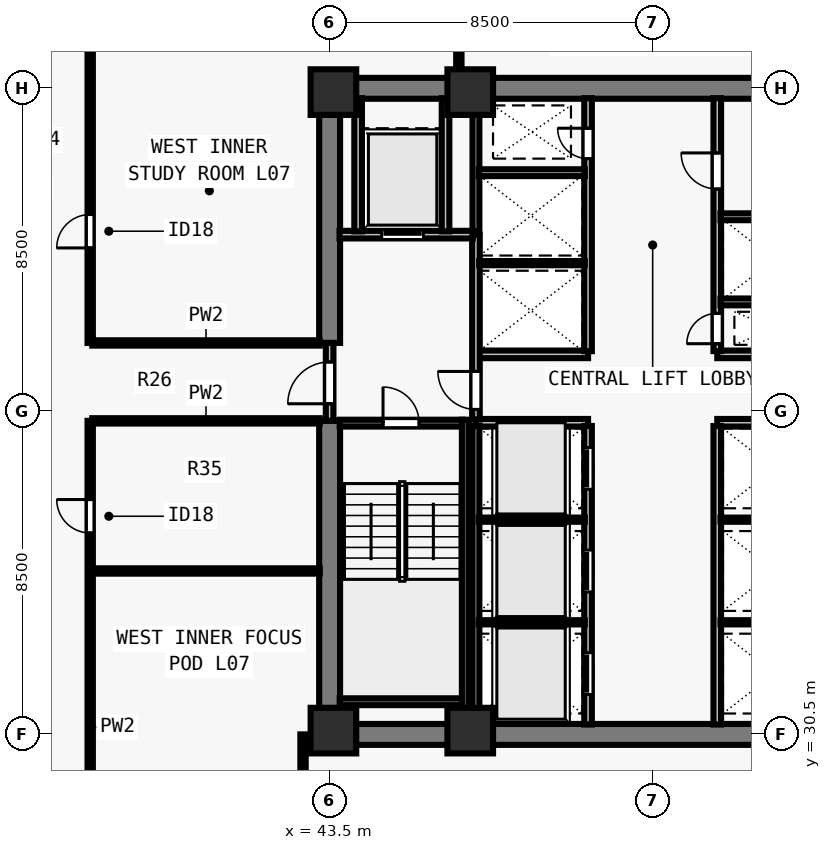
"""IFC4 building model, lengths in metres.
Left out: names, types, materials, properties, quantities, classifications, styles, units other than length and angle.
Written with IfcOpenShell. Run it as: python <this file> out.ifc"""

import sys

from ifc_helpers import new_model, si_unit, direction, frame, frame_2d, origin, origin_2d, place, context, subcontext, project, spatial, rectangle, extrude, element, fill, save


model = new_model("IFC4")
c1 = context("Model", 3, precision=1e-05, world=origin(), true_north=direction((0.0, 1.0)))
c2 = subcontext(c1, "Body", "Model", "MODEL_VIEW")
j1 = project(units=[si_unit("LENGTHUNIT", "METRE"), si_unit("PLANEANGLEUNIT", "RADIAN")], contexts=[c1])
p1 = place(None, origin())
s1 = spatial("IfcSite", under=j1, at=p1, CompositionType="ELEMENT")
p2 = place(p1, origin())
s2 = spatial("IfcBuilding", under=s1, at=p2, CompositionType="ELEMENT")
p3 = place(p2, frame((0.0, 0.0, 30.5)))
s3 = spatial("IfcBuildingStorey", under=s2, at=p3, CompositionType="ELEMENT", Elevation=30.5)
for number, where, z_axis, x_axis in (
    (1, (43.6, 30.6, 0.0), (0.0, 0.0, 1.0), (1.0, 0.0, 0.0)),
    (2, (47.2, 30.6, 0.0), (0.0, 0.0, 1.0), (1.0, 0.0, 0.0)),
    (3, (43.6, 47.4, 0.0), (0.0, 0.0, 1.0), (1.0, 0.0, 0.0)),
    (4, (47.2, 47.4, 0.0), (0.0, 0.0, 1.0), (1.0, 0.0, 0.0)),
):
    element("IfcColumn", number, at=place(p3, frame(where, z_axis=z_axis, x_axis=x_axis)), inside=s3, PredefinedType="COLUMN", context=c2, shape_type="SweptSolid", body=[
        extrude(rectangle(XDim=1.2, YDim=1.2, at=origin_2d()), origin(), (0.0, 0.0, 1.0), 3.5),
    ])
for number, where, z_axis, x_axis in (
    (5, (43.225, 30.5, 0.0), (0.0, 0.0, 1.0), (1.0, 0.0, 0.0)),
    (6, (43.225, 47.5, 0.0), (0.0, 0.0, 1.0), (1.0, 0.0, 0.0)),
):
    element("IfcWall", number, at=place(p3, frame(where, z_axis=z_axis, x_axis=x_axis)), inside=s3, PredefinedType="SHEAR", context=c2, shape_type="SweptSolid", body=[
        extrude(rectangle(XDim=17.55, YDim=0.55, at=frame_2d((8.775, 0.0))), origin(), (0.0, 0.0, 1.0), 3.28),
    ])
p4 = place(p3, frame((43.5, 30.765, 0.0), z_axis=(0.0, 0.0, 1.0), x_axis=(0.0, 1.0, 0.0)))
e7 = element("IfcWall", 7, at=p4, inside=s3, PredefinedType="SHEAR", context=c2, shape_type="SweptSolid", body=[
    extrude(rectangle(XDim=7.985, YDim=0.55, at=frame_2d((3.993, 0.0))), origin(), (0.0, 0.0, 1.0), 3.28),
])
p5 = place(p3, frame((43.5, 40.8, 0.0), z_axis=(0.0, 0.0, 1.0), x_axis=(0.0, 1.0, 0.0)))
e8 = element("IfcWall", 8, at=p5, inside=s3, PredefinedType="SHEAR", context=c2, shape_type="SweptSolid", body=[
    extrude(rectangle(XDim=6.435, YDim=0.55, at=frame_2d((3.218, 0.0))), origin(), (0.0, 0.0, 1.0), 3.28),
])
for number, where, z_axis, x_axis in (
    (9, (47.35, 38.7, 0.0), (0.0, 0.0, 1.0), (1.0, 0.0, 0.0)),
    (10, (47.35, 40.5, 0.0), (0.0, 0.0, 1.0), (1.0, 0.0, 0.0)),
    (11, (53.7, 38.7, 0.0), (0.0, 0.0, 1.0), (1.0, 0.0, 0.0)),
    (12, (53.7, 40.5, 0.0), (0.0, 0.0, 1.0), (1.0, 0.0, 0.0)),
):
    element("IfcWall", number, at=place(p3, frame(where, z_axis=z_axis, x_axis=x_axis)), inside=s3, PredefinedType="SOLIDWALL", context=c2, shape_type="SweptSolid", body=[
        extrude(rectangle(XDim=2.95, YDim=0.2, at=frame_2d((1.475, 0.0))), origin(), (0.0, 0.0, 1.0), 3.28),
    ])
p6 = place(p3, frame((50.3, 30.76, 0.0), z_axis=(0.0, 0.0, 1.0), x_axis=(0.0, 1.0, 0.0)))
e13 = element("IfcWall", 13, at=p6, inside=s3, PredefinedType="SOLIDWALL", context=c2, shape_type="SweptSolid", body=[
    extrude(rectangle(XDim=7.855, YDim=0.2, at=frame_2d((3.927, 0.0))), origin(), (0.0, 0.0, 1.0), 3.28),
])
p7 = place(p6, frame((0.79, 0.0, 0.0)))
e14 = element("IfcOpeningElement", 14, at=p7, cuts=e13, PredefinedType="OPENING", context=c2, shape_type="SweptSolid", body=[
    extrude(rectangle(XDim=1.1, YDim=2.2, at=frame_2d((0.55, 1.1))), frame((0.0, 0.11, 0.0), z_axis=(0.0, -1.0, 0.0), x_axis=(1.0, 0.0, 0.0)), (0.0, 0.0, 1.0), 0.22),
])
p8 = place(p6, frame((3.49, 0.0, 0.0)))
e15 = element("IfcOpeningElement", 15, at=p8, cuts=e13, PredefinedType="OPENING", context=c2, shape_type="SweptSolid", body=[
    extrude(rectangle(XDim=1.1, YDim=2.2, at=frame_2d((0.55, 1.1))), frame((0.0, 0.11, 0.0), z_axis=(0.0, -1.0, 0.0), x_axis=(1.0, 0.0, 0.0)), (0.0, 0.0, 1.0), 0.22),
])
p9 = place(p6, frame((6.19, 0.0, 0.0)))
e16 = element("IfcOpeningElement", 16, at=p9, cuts=e13, PredefinedType="OPENING", context=c2, shape_type="SweptSolid", body=[
    extrude(rectangle(XDim=1.1, YDim=2.2, at=frame_2d((0.55, 1.1))), frame((0.0, 0.11, 0.0), z_axis=(0.0, -1.0, 0.0), x_axis=(1.0, 0.0, 0.0)), (0.0, 0.0, 1.0), 0.22),
])
p10 = place(p3, frame((53.7, 30.76, 0.0), z_axis=(0.0, 0.0, 1.0), x_axis=(0.0, 1.0, 0.0)))
e17 = element("IfcWall", 17, at=p10, inside=s3, PredefinedType="SOLIDWALL", context=c2, shape_type="SweptSolid", body=[
    extrude(rectangle(XDim=7.855, YDim=0.2, at=frame_2d((3.927, 0.0))), origin(), (0.0, 0.0, 1.0), 3.28),
])
p11 = place(p3, frame((50.3, 40.585, 0.0), z_axis=(0.0, 0.0, 1.0), x_axis=(0.0, 1.0, 0.0)))
e18 = element("IfcWall", 18, at=p11, inside=s3, PredefinedType="SOLIDWALL", context=c2, shape_type="SweptSolid", body=[
    extrude(rectangle(XDim=6.655, YDim=0.2, at=frame_2d((3.328, 0.0))), origin(), (0.0, 0.0, 1.0), 3.28),
])
p12 = place(p11, frame((5.065, 0.0, 0.0)))
e19 = element("IfcOpeningElement", 19, at=p12, cuts=e18, PredefinedType="OPENING", context=c2, shape_type="SweptSolid", body=[
    extrude(rectangle(XDim=0.8, YDim=2.08, at=frame_2d((0.4, 1.04))), frame((0.0, 0.11, 0.0), z_axis=(0.0, -1.0, 0.0), x_axis=(1.0, 0.0, 0.0)), (0.0, 0.0, 1.0), 0.22),
])
p13 = place(p3, frame((53.7, 40.585, 0.0), z_axis=(0.0, 0.0, 1.0), x_axis=(0.0, 1.0, 0.0)))
e20 = element("IfcWall", 20, at=p13, inside=s3, PredefinedType="SOLIDWALL", context=c2, shape_type="SweptSolid", body=[
    extrude(rectangle(XDim=6.655, YDim=0.2, at=frame_2d((3.328, 0.0))), origin(), (0.0, 0.0, 1.0), 3.28),
])
p14 = place(p13, frame((0.195, 0.0, 0.0)))
e21 = element("IfcOpeningElement", 21, at=p14, cuts=e20, PredefinedType="OPENING", context=c2, shape_type="SweptSolid", body=[
    extrude(rectangle(XDim=0.8, YDim=2.08, at=frame_2d((0.4, 1.04))), frame((0.0, 0.11, 0.0), z_axis=(0.0, -1.0, 0.0), x_axis=(1.0, 0.0, 0.0)), (0.0, 0.0, 1.0), 0.22),
])
p15 = place(p13, frame((4.265, 0.0, 0.0)))
e22 = element("IfcOpeningElement", 22, at=p15, cuts=e20, PredefinedType="OPENING", context=c2, shape_type="SweptSolid", body=[
    extrude(rectangle(XDim=0.95, YDim=2.12, at=frame_2d((0.475, 1.06))), frame((0.0, 0.11, 0.0), z_axis=(0.0, -1.0, 0.0), x_axis=(1.0, 0.0, 0.0)), (0.0, 0.0, 1.0), 0.22),
])
p16 = place(p3, frame((43.5, 38.75, 0.0), z_axis=(0.0, 0.0, 1.0), x_axis=(0.0, 1.0, 0.0)))
e23 = element("IfcWall", 23, at=p16, inside=s3, PredefinedType="SOLIDWALL", context=c2, shape_type="SweptSolid", body=[
    extrude(rectangle(XDim=2.05, YDim=0.2, at=frame_2d((1.025, 0.0))), origin(), (0.0, 0.0, 1.0), 3.28),
])
p17 = place(p16, frame((0.45, 0.0, 0.0)))
e24 = element("IfcOpeningElement", 24, at=p17, cuts=e23, PredefinedType="OPENING", context=c2, shape_type="SweptSolid", body=[
    extrude(rectangle(XDim=1.1, YDim=2.15, at=frame_2d((0.55, 1.075))), frame((0.0, 0.11, 0.0), z_axis=(0.0, -1.0, 0.0), x_axis=(1.0, 0.0, 0.0)), (0.0, 0.0, 1.0), 0.22),
])
p18 = place(p3, frame((47.35, 38.785, 0.0), z_axis=(0.0, 0.0, 1.0), x_axis=(0.0, 1.0, 0.0)))
e25 = element("IfcWall", 25, at=p18, inside=s3, PredefinedType="SOLIDWALL", context=c2, shape_type="SweptSolid", body=[
    extrude(rectangle(XDim=4.865, YDim=0.2, at=frame_2d((2.433, 0.0))), origin(), (0.0, 0.0, 1.0), 3.28),
])
p19 = place(p18, frame((0.265, 0.0, 0.0)))
e26 = element("IfcOpeningElement", 26, at=p19, cuts=e25, PredefinedType="OPENING", context=c2, shape_type="SweptSolid", body=[
    extrude(rectangle(XDim=1.0, YDim=2.15, at=frame_2d((0.5, 1.075))), frame((0.0, 0.11, 0.0), z_axis=(0.0, -1.0, 0.0), x_axis=(1.0, 0.0, 0.0)), (0.0, 0.0, 1.0), 0.22),
])
p20 = place(p3, frame((43.76, 43.65, 0.0), z_axis=(0.0, 0.0, 1.0), x_axis=(1.0, 0.0, 0.0)))
e27 = element("IfcWall", 27, at=p20, inside=s3, PredefinedType="SOLIDWALL", context=c2, shape_type="SweptSolid", body=[
    extrude(rectangle(XDim=3.505, YDim=0.2, at=frame_2d((1.752, 0.0))), origin(), (0.0, 0.0, 1.0), 3.28),
])
p21 = place(p20, frame((1.11, 0.0, 0.0)))
e28 = element("IfcOpeningElement", 28, at=p21, cuts=e27, PredefinedType="OPENING", context=c2, shape_type="SweptSolid", body=[
    extrude(rectangle(XDim=1.1, YDim=2.2, at=frame_2d((0.55, 1.1))), frame((0.0, 0.11, 0.0), z_axis=(0.0, -1.0, 0.0), x_axis=(1.0, 0.0, 0.0)), (0.0, 0.0, 1.0), 0.22),
])
for number, where, z_axis, x_axis in (
    (29, (46.55, 43.735, 0.0), (0.0, 0.0, 1.0), (0.0, 1.0, 0.0)),
    (30, (44.25, 43.735, 0.0), (0.0, 0.0, 1.0), (0.0, 1.0, 0.0)),
):
    element("IfcWall", number, at=place(p3, frame(where, z_axis=z_axis, x_axis=x_axis)), inside=s3, PredefinedType="SOLIDWALL", context=c2, shape_type="SweptSolid", body=[
        extrude(rectangle(XDim=3.505, YDim=0.2, at=frame_2d((1.752, 0.0))), origin(), (0.0, 0.0, 1.0), 3.28),
    ])
p22 = place(p3, frame((47.35, 30.76, 0.0), z_axis=(0.0, 0.0, 1.0), x_axis=(0.0, 1.0, 0.0)))
e31 = element("IfcWall", 31, at=p22, inside=s3, PredefinedType="SOLIDWALL", context=c2, shape_type="SweptSolid", body=[
    extrude(rectangle(XDim=7.855, YDim=0.18, at=frame_2d((3.927, 0.0))), origin(), (0.0, 0.0, 1.0), 3.28),
])
for number, where, z_axis, x_axis in (
    (32, (47.425, 33.45, 0.0), (0.0, 0.0, 1.0), (1.0, 0.0, 0.0)),
    (33, (47.425, 36.15, 0.0), (0.0, 0.0, 1.0), (1.0, 0.0, 0.0)),
    (34, (53.785, 33.45, 0.0), (0.0, 0.0, 1.0), (1.0, 0.0, 0.0)),
    (35, (53.785, 36.15, 0.0), (0.0, 0.0, 1.0), (1.0, 0.0, 0.0)),
):
    element("IfcWall", number, at=place(p3, frame(where, z_axis=z_axis, x_axis=x_axis)), inside=s3, PredefinedType="PARTITIONING", context=c2, shape_type="SweptSolid", body=[
        extrude(rectangle(XDim=2.79, YDim=0.11, at=frame_2d((1.395, 0.0))), origin(), (0.0, 0.0, 1.0), 3.28),
    ])
p23 = place(p3, frame((47.35, 43.735, 0.0), z_axis=(0.0, 0.0, 1.0), x_axis=(0.0, 1.0, 0.0)))
e36 = element("IfcWall", 36, at=p23, inside=s3, PredefinedType="SOLIDWALL", context=c2, shape_type="SweptSolid", body=[
    extrude(rectangle(XDim=3.505, YDim=0.18, at=frame_2d((1.752, 0.0))), origin(), (0.0, 0.0, 1.0), 3.28),
])
p24 = place(p3, frame((47.435, 42.9, 0.0), z_axis=(0.0, 0.0, 1.0), x_axis=(1.0, 0.0, 0.0)))
e37 = element("IfcWall", 37, at=p24, inside=s3, PredefinedType="PARTITIONING", context=c2, shape_type="SweptSolid", body=[
    extrude(rectangle(XDim=2.78, YDim=0.11, at=frame_2d((1.39, 0.0))), origin(), (0.0, 0.0, 1.0), 3.28),
])
p25 = place(p3, frame((47.425, 45.28, 0.0), z_axis=(0.0, 0.0, 1.0), x_axis=(1.0, 0.0, 0.0)))
e38 = element("IfcWall", 38, at=p25, inside=s3, PredefinedType="SOLIDWALL", context=c2, shape_type="SweptSolid", body=[
    extrude(rectangle(XDim=2.79, YDim=0.18, at=frame_2d((1.395, 0.0))), origin(), (0.0, 0.0, 1.0), 3.28),
])
p26 = place(p3, frame((53.785, 41.88, 0.0), z_axis=(0.0, 0.0, 1.0), x_axis=(1.0, 0.0, 0.0)))
e39 = element("IfcWall", 39, at=p26, inside=s3, PredefinedType="SOLIDWALL", context=c2, shape_type="SweptSolid", body=[
    extrude(rectangle(XDim=2.78, YDim=0.18, at=frame_2d((1.39, 0.0))), origin(), (0.0, 0.0, 1.0), 3.28),
])
p27 = place(p3, frame((53.785, 44.12, 0.0), z_axis=(0.0, 0.0, 1.0), x_axis=(1.0, 0.0, 0.0)))
e40 = element("IfcWall", 40, at=p27, inside=s3, PredefinedType="SOLIDWALL", context=c2, shape_type="SweptSolid", body=[
    extrude(rectangle(XDim=2.79, YDim=0.18, at=frame_2d((1.395, 0.0))), origin(), (0.0, 0.0, 1.0), 3.28),
])
p28 = place(p3, frame((37.2, 23.655, 0.0), z_axis=(0.0, 0.0, 1.0), x_axis=(0.0, 1.0, 0.0)))
e41 = element("IfcWall", 41, at=p28, inside=s3, PredefinedType="PARTITIONING", context=c2, shape_type="SweptSolid", body=[
    extrude(rectangle(XDim=15.095, YDim=0.14, at=frame_2d((7.547, 0.0))), origin(), (0.0, 0.0, 1.0), 3.28),
])
p29 = place(p28, frame((1.045, 0.0, 0.0)))
e42 = element("IfcOpeningElement", 42, at=p29, cuts=e41, PredefinedType="OPENING", context=c2, shape_type="SweptSolid", body=[
    extrude(rectangle(XDim=0.88, YDim=2.1, at=frame_2d((0.44, 1.05))), frame((0.0, 0.08, 0.0), z_axis=(0.0, -1.0, 0.0), x_axis=(1.0, 0.0, 0.0)), (0.0, 0.0, 1.0), 0.16),
])
p30 = place(p28, frame((12.145, 0.0, 0.0)))
e43 = element("IfcOpeningElement", 43, at=p30, cuts=e41, PredefinedType="OPENING", context=c2, shape_type="SweptSolid", body=[
    extrude(rectangle(XDim=0.88, YDim=2.1, at=frame_2d((0.44, 1.05))), frame((0.0, 0.08, 0.0), z_axis=(0.0, -1.0, 0.0), x_axis=(1.0, 0.0, 0.0)), (0.0, 0.0, 1.0), 0.16),
])
p31 = place(p3, frame((37.2, 40.8, 0.0), z_axis=(0.0, 0.0, 1.0), x_axis=(0.0, 1.0, 0.0)))
e44 = element("IfcWall", 44, at=p31, inside=s3, PredefinedType="PARTITIONING", context=c2, shape_type="SweptSolid", body=[
    extrude(rectangle(XDim=13.545, YDim=0.14, at=frame_2d((6.772, 0.0))), origin(), (0.0, 0.0, 1.0), 3.28),
])
p32 = place(p31, frame((2.5, 0.0, 0.0)))
e45 = element("IfcOpeningElement", 45, at=p32, cuts=e44, PredefinedType="OPENING", context=c2, shape_type="SweptSolid", body=[
    extrude(rectangle(XDim=0.88, YDim=2.1, at=frame_2d((0.44, 1.05))), frame((0.0, 0.08, 0.0), z_axis=(0.0, -1.0, 0.0), x_axis=(1.0, 0.0, 0.0)), (0.0, 0.0, 1.0), 0.16),
])
for number, where, z_axis, x_axis in (
    (46, (37.255, 38.75, 0.0), (0.0, 0.0, 1.0), (1.0, 0.0, 0.0)),
    (47, (37.255, 40.8, 0.0), (0.0, 0.0, 1.0), (1.0, 0.0, 0.0)),
):
    element("IfcWall", number, at=place(p3, frame(where, z_axis=z_axis, x_axis=x_axis)), inside=s3, PredefinedType="PARTITIONING", context=c2, shape_type="SweptSolid", body=[
        extrude(rectangle(XDim=5.985, YDim=0.14, at=frame_2d((2.993, 0.0))), origin(), (0.0, 0.0, 1.0), 3.28),
    ])
p33 = place(p3, frame((42.8, 23.655, 0.0), z_axis=(0.0, 0.0, 1.0), x_axis=(0.0, 1.0, 0.0)))
e48 = element("IfcWall", 48, at=p33, inside=s3, PredefinedType="PARTITIONING", context=c2, shape_type="SweptSolid", body=[
    extrude(rectangle(XDim=6.845, YDim=0.14, at=frame_2d((3.422, 0.0))), origin(), (0.0, 0.0, 1.0), 2.439),
])
p34 = place(p3, frame((46.9, 47.76, 0.0), z_axis=(0.0, 0.0, 1.0), x_axis=(0.0, 1.0, 0.0)))
e49 = element("IfcWall", 49, at=p34, inside=s3, PredefinedType="PARTITIONING", context=c2, shape_type="SweptSolid", body=[
    extrude(rectangle(XDim=6.585, YDim=0.14, at=frame_2d((3.292, 0.0))), origin(), (0.0, 0.0, 1.0), 3.28),
])
p35 = place(p3, frame((37.255, 34.8, 0.0), z_axis=(0.0, 0.0, 1.0), x_axis=(1.0, 0.0, 0.0)))
e50 = element("IfcWall", 50, at=p35, inside=s3, PredefinedType="PARTITIONING", context=c2, shape_type="SweptSolid", body=[
    extrude(rectangle(XDim=5.985, YDim=0.14, at=frame_2d((2.993, 0.0))), origin(), (0.0, 0.0, 1.0), 3.28),
])
p36 = place(p3, frame((43.765, 38.69, 0.0), z_axis=(0.0, 0.0, 1.0), x_axis=(1.0, 0.0, 0.0)))
e51 = element("IfcWall", 51, at=p36, inside=s3, PredefinedType="SOLIDWALL", context=c2, shape_type="SweptSolid", body=[
    extrude(rectangle(XDim=3.23, YDim=0.18, at=frame_2d((1.615, 0.0))), origin(), (0.0, 0.0, 1.0), 3.28),
])
p37 = place(p36, frame((1.14, 0.0, 0.0)))
e52 = element("IfcOpeningElement", 52, at=p37, cuts=e51, PredefinedType="OPENING", context=c2, shape_type="SweptSolid", body=[
    extrude(rectangle(XDim=0.95, YDim=2.15, at=frame_2d((0.475, 1.075))), frame((0.0, 0.1, 0.0), z_axis=(0.0, -1.0, 0.0), x_axis=(1.0, 0.0, 0.0)), (0.0, 0.0, 1.0), 0.2),
])
p38 = place(p3, frame((43.765, 31.36, 0.0), z_axis=(0.0, 0.0, 1.0), x_axis=(1.0, 0.0, 0.0)))
e53 = element("IfcWall", 53, at=p38, inside=s3, PredefinedType="SOLIDWALL", context=c2, shape_type="SweptSolid", body=[
    extrude(rectangle(XDim=3.23, YDim=0.18, at=frame_2d((1.615, 0.0))), origin(), (0.0, 0.0, 1.0), 3.28),
])
p39 = place(p3, frame((47.07, 38.78, 0.0), z_axis=(0.0, 0.0, 1.0), x_axis=(0.0, -1.0, 0.0)))
e54 = element("IfcWall", 54, at=p39, inside=s3, PredefinedType="SOLIDWALL", context=c2, shape_type="SweptSolid", body=[
    extrude(rectangle(XDim=8.017, YDim=0.18, at=frame_2d((4.009, 0.0))), origin(), (0.0, 0.0, 1.0), 3.28),
])
p40 = place(p17, origin())
e55 = element("IfcDoor", 55, at=p40, inside=s3, OperationType="SINGLE_SWING_LEFT", PredefinedType="DOOR", context=c2, shape_type="SweptSolid", body=[
    extrude(rectangle(XDim=1.1, YDim=2.15, at=frame_2d((0.55, 1.075))), frame((0.0, 0.025, 0.0), z_axis=(0.0, -1.0, 0.0), x_axis=(1.0, 0.0, 0.0)), (0.0, 0.0, 1.0), 0.05),
])
fill(e24, e55)
p41 = place(p19, origin())
e56 = element("IfcDoor", 56, at=p41, inside=s3, OperationType="SINGLE_SWING_RIGHT", PredefinedType="DOOR", context=c2, shape_type="SweptSolid", body=[
    extrude(rectangle(XDim=1.0, YDim=2.15, at=frame_2d((0.5, 1.075))), frame((0.0, 0.025, 0.0), z_axis=(0.0, -1.0, 0.0), x_axis=(1.0, 0.0, 0.0)), (0.0, 0.0, 1.0), 0.05),
])
fill(e26, e56)
p42 = place(p21, origin())
e57 = element("IfcDoor", 57, at=p42, inside=s3, OperationType="SLIDING_TO_LEFT", PredefinedType="DOOR", context=c2, shape_type="SweptSolid", body=[
    extrude(rectangle(XDim=1.1, YDim=2.2, at=frame_2d((0.55, 1.1))), frame((0.0, 0.025, 0.0), z_axis=(0.0, -1.0, 0.0), x_axis=(1.0, 0.0, 0.0)), (0.0, 0.0, 1.0), 0.05),
])
fill(e28, e57)
p43 = place(p7, origin())
e58 = element("IfcDoor", 58, at=p43, inside=s3, OperationType="SLIDING_TO_LEFT", PredefinedType="DOOR", context=c2, shape_type="SweptSolid", body=[
    extrude(rectangle(XDim=1.1, YDim=2.2, at=frame_2d((0.55, 1.1))), frame((0.0, 0.025, 0.0), z_axis=(0.0, -1.0, 0.0), x_axis=(1.0, 0.0, 0.0)), (0.0, 0.0, 1.0), 0.05),
])
fill(e14, e58)
p44 = place(p8, origin())
e59 = element("IfcDoor", 59, at=p44, inside=s3, OperationType="SLIDING_TO_LEFT", PredefinedType="DOOR", context=c2, shape_type="SweptSolid", body=[
    extrude(rectangle(XDim=1.1, YDim=2.2, at=frame_2d((0.55, 1.1))), frame((0.0, 0.025, 0.0), z_axis=(0.0, -1.0, 0.0), x_axis=(1.0, 0.0, 0.0)), (0.0, 0.0, 1.0), 0.05),
])
fill(e15, e59)
p45 = place(p9, origin())
e60 = element("IfcDoor", 60, at=p45, inside=s3, OperationType="SLIDING_TO_LEFT", PredefinedType="DOOR", context=c2, shape_type="SweptSolid", body=[
    extrude(rectangle(XDim=1.1, YDim=2.2, at=frame_2d((0.55, 1.1))), frame((0.0, 0.025, 0.0), z_axis=(0.0, -1.0, 0.0), x_axis=(1.0, 0.0, 0.0)), (0.0, 0.0, 1.0), 0.05),
])
fill(e16, e60)
p46 = place(p12, origin())
e61 = element("IfcDoor", 61, at=p46, inside=s3, OperationType="SINGLE_SWING_RIGHT", PredefinedType="DOOR", context=c2, shape_type="SweptSolid", body=[
    extrude(rectangle(XDim=0.8, YDim=2.08, at=frame_2d((0.4, 1.04))), frame((0.0, 0.025, 0.0), z_axis=(0.0, -1.0, 0.0), x_axis=(1.0, 0.0, 0.0)), (0.0, 0.0, 1.0), 0.05),
])
fill(e19, e61)
p47 = place(p14, origin())
e62 = element("IfcDoor", 62, at=p47, inside=s3, OperationType="SINGLE_SWING_LEFT", PredefinedType="DOOR", context=c2, shape_type="SweptSolid", body=[
    extrude(rectangle(XDim=0.8, YDim=2.08, at=frame_2d((0.4, 1.04))), frame((0.0, 0.025, 0.0), z_axis=(0.0, -1.0, 0.0), x_axis=(1.0, 0.0, 0.0)), (0.0, 0.0, 1.0), 0.05),
])
fill(e21, e62)
p48 = place(p15, origin())
e63 = element("IfcDoor", 63, at=p48, inside=s3, OperationType="SINGLE_SWING_RIGHT", PredefinedType="DOOR", context=c2, shape_type="SweptSolid", body=[
    extrude(rectangle(XDim=0.95, YDim=2.12, at=frame_2d((0.475, 1.06))), frame((0.0, 0.025, 0.0), z_axis=(0.0, -1.0, 0.0), x_axis=(1.0, 0.0, 0.0)), (0.0, 0.0, 1.0), 0.05),
])
fill(e22, e63)
p49 = place(p30, origin())
e64 = element("IfcDoor", 64, at=p49, inside=s3, OperationType="SINGLE_SWING_RIGHT", PredefinedType="DOOR", context=c2, shape_type="SweptSolid", body=[
    extrude(rectangle(XDim=0.88, YDim=2.1, at=frame_2d((0.44, 1.05))), frame((0.0, 0.025, 0.0), z_axis=(0.0, -1.0, 0.0), x_axis=(1.0, 0.0, 0.0)), (0.0, 0.0, 1.0), 0.05),
])
fill(e43, e64)
p50 = place(p32, origin())
e65 = element("IfcDoor", 65, at=p50, inside=s3, OperationType="SINGLE_SWING_LEFT", PredefinedType="DOOR", context=c2, shape_type="SweptSolid", body=[
    extrude(rectangle(XDim=0.88, YDim=2.1, at=frame_2d((0.44, 1.05))), frame((0.0, 0.025, 0.0), z_axis=(0.0, -1.0, 0.0), x_axis=(1.0, 0.0, 0.0)), (0.0, 0.0, 1.0), 0.05),
])
fill(e45, e65)
p51 = place(p37, origin())
e66 = element("IfcDoor", 66, at=p51, inside=s3, OperationType="SINGLE_SWING_LEFT", PredefinedType="DOOR", context=c2, shape_type="SweptSolid", body=[
    extrude(rectangle(XDim=0.95, YDim=2.15, at=frame_2d((0.475, 1.075))), frame((0.0, 0.025, 0.0), z_axis=(0.0, -1.0, 0.0), x_axis=(1.0, 0.0, 0.0)), (0.0, 0.0, 1.0), 0.05),
])
fill(e52, e66)
save(model, sys.argv[1])
